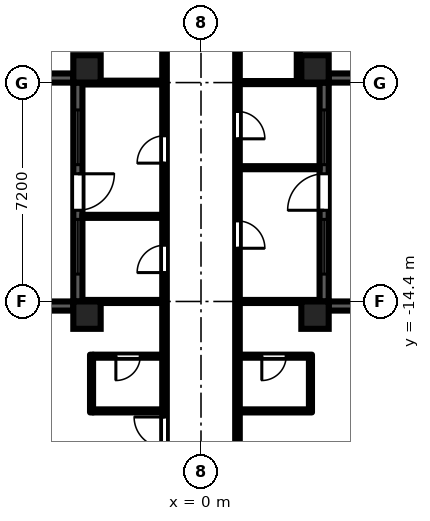
"""IFC4 building model, lengths in metres.
Left out: names, types, materials, properties, quantities, classifications, styles, units other than length and angle.
Written with IfcOpenShell. Run it as: python <this file> out.ifc"""

import sys

from ifc_helpers import new_model, si_unit, direction, frame, frame_2d, origin, origin_2d, place, context, subcontext, project, spatial, rectangle, extrude, element, fill, save


model = new_model("IFC4")
c1 = context("Model", 3, precision=1e-05, world=origin(), true_north=direction((0.0, 1.0)))
c2 = subcontext(c1, "Body", "Model", "MODEL_VIEW")
j1 = project(units=[si_unit("LENGTHUNIT", "METRE"), si_unit("PLANEANGLEUNIT", "RADIAN")], contexts=[c1])
p1 = place(None, origin())
s1 = spatial("IfcSite", under=j1, at=p1, CompositionType="ELEMENT")
p2 = place(p1, origin())
s2 = spatial("IfcBuilding", under=s1, at=p2, CompositionType="ELEMENT")
p3 = place(p2, frame((0.0, 0.0, 35.7)))
s3 = spatial("IfcBuildingStorey", under=s2, at=p3, CompositionType="ELEMENT", Elevation=35.7)
for number, where, z_axis, x_axis in (
    (1, (-3.75, -14.85, 0.0), (0.0, 0.0, 1.0), (1.0, 0.0, 0.0)),
    (2, (-3.75, -6.75, 0.0), (0.0, 0.0, 1.0), (1.0, 0.0, 0.0)),
    (3, (3.75, -14.85, 0.0), (0.0, 0.0, 1.0), (1.0, 0.0, 0.0)),
    (4, (3.75, -6.75, 0.0), (0.0, 0.0, 1.0), (1.0, 0.0, 0.0)),
):
    element("IfcColumn", number, at=place(p3, frame(where, z_axis=z_axis, x_axis=x_axis)), inside=s3, PredefinedType="COLUMN", context=c2, shape_type="SweptSolid", body=[
        extrude(rectangle(XDim=0.9, YDim=0.9, at=origin_2d()), origin(), (0.0, 0.0, 1.0), 3.0),
    ])
p4 = place(p3, frame((-7.2, -7.05, 0.0), z_axis=(0.0, 0.0, 1.0), x_axis=(1.0, 0.0, 0.0)))
e5 = element("IfcWall", 5, at=p4, inside=s3, PredefinedType="SOLIDWALL", context=c2, shape_type="SweptSolid", body=[
    extrude(rectangle(XDim=3.0, YDim=0.3, at=frame_2d((1.5, 0.0))), origin(), (0.0, 0.0, 1.0), 2.1),
])
p5 = place(p3, frame((-4.05, -7.2, 0.0), z_axis=(0.0, 0.0, 1.0), x_axis=(0.0, -1.0, 0.0)))
e6 = element("IfcWall", 6, at=p5, inside=s3, PredefinedType="SOLIDWALL", context=c2, shape_type="SweptSolid", body=[
    extrude(rectangle(XDim=7.2, YDim=0.3, at=frame_2d((3.6, 0.0))), origin(), (0.0, 0.0, 1.0), 2.1),
])
p6 = place(p5, frame((3.0, 0.0, 0.0)))
e7 = element("IfcOpeningElement", 7, at=p6, cuts=e6, PredefinedType="OPENING", context=c2, shape_type="SweptSolid", body=[
    extrude(rectangle(XDim=1.2, YDim=2.05, at=frame_2d((0.6, 1.025))), frame((0.0, 0.16, 0.0), z_axis=(0.0, -1.0, 0.0), x_axis=(1.0, 0.0, 0.0)), (0.0, 0.0, 1.0), 0.32),
])
p7 = place(p5, frame((0.9, 0.0, 0.2)))
e8 = element("IfcOpeningElement", 8, at=p7, cuts=e6, PredefinedType="OPENING", context=c2, shape_type="SweptSolid", body=[
    extrude(rectangle(XDim=1.8, YDim=1.85, at=frame_2d((0.9, 0.925))), frame((0.0, 0.16, 0.0), z_axis=(0.0, -1.0, 0.0), x_axis=(1.0, 0.0, 0.0)), (0.0, 0.0, 1.0), 0.32),
])
p8 = place(p5, frame((4.5, 0.0, 0.2)))
e9 = element("IfcOpeningElement", 9, at=p8, cuts=e6, PredefinedType="OPENING", context=c2, shape_type="SweptSolid", body=[
    extrude(rectangle(XDim=1.8, YDim=1.85, at=frame_2d((0.9, 0.925))), frame((0.0, 0.16, 0.0), z_axis=(0.0, -1.0, 0.0), x_axis=(1.0, 0.0, 0.0)), (0.0, 0.0, 1.0), 0.32),
])
for number, where, z_axis, x_axis in (
    (10, (-4.2, -14.55, 0.0), (0.0, 0.0, 1.0), (-1.0, 0.0, 0.0)),
    (11, (6.3, -14.55, 0.0), (0.0, 0.0, 1.0), (-1.0, 0.0, 0.0)),
):
    element("IfcWall", number, at=place(p3, frame(where, z_axis=z_axis, x_axis=x_axis)), inside=s3, PredefinedType="SOLIDWALL", context=c2, shape_type="SweptSolid", body=[
        extrude(rectangle(XDim=2.1, YDim=0.3, at=frame_2d((1.05, 0.0))), origin(), (0.0, 0.0, 1.0), 2.1),
    ])
p9 = place(p3, frame((4.05, -14.4, 0.0), z_axis=(0.0, 0.0, 1.0), x_axis=(0.0, 1.0, 0.0)))
e12 = element("IfcWall", 12, at=p9, inside=s3, PredefinedType="SOLIDWALL", context=c2, shape_type="SweptSolid", body=[
    extrude(rectangle(XDim=7.2, YDim=0.3, at=frame_2d((3.6, 0.0))), origin(), (0.0, 0.0, 1.0), 2.1),
])
p10 = place(p9, frame((3.0, 0.0, 0.0)))
e13 = element("IfcOpeningElement", 13, at=p10, cuts=e12, PredefinedType="OPENING", context=c2, shape_type="SweptSolid", body=[
    extrude(rectangle(XDim=1.2, YDim=2.05, at=frame_2d((0.6, 1.025))), frame((0.0, 0.16, 0.0), z_axis=(0.0, -1.0, 0.0), x_axis=(1.0, 0.0, 0.0)), (0.0, 0.0, 1.0), 0.32),
])
p11 = place(p9, frame((0.9, 0.0, 0.2)))
e14 = element("IfcOpeningElement", 14, at=p11, cuts=e12, PredefinedType="OPENING", context=c2, shape_type="SweptSolid", body=[
    extrude(rectangle(XDim=1.8, YDim=1.85, at=frame_2d((0.9, 0.925))), frame((0.0, 0.16, 0.0), z_axis=(0.0, -1.0, 0.0), x_axis=(1.0, 0.0, 0.0)), (0.0, 0.0, 1.0), 0.32),
])
p12 = place(p9, frame((4.5, 0.0, 0.2)))
e15 = element("IfcOpeningElement", 15, at=p12, cuts=e12, PredefinedType="OPENING", context=c2, shape_type="SweptSolid", body=[
    extrude(rectangle(XDim=1.8, YDim=1.85, at=frame_2d((0.9, 0.925))), frame((0.0, 0.16, 0.0), z_axis=(0.0, -1.0, 0.0), x_axis=(1.0, 0.0, 0.0)), (0.0, 0.0, 1.0), 0.32),
])
p13 = place(p3, frame((4.2, -7.05, 0.0), z_axis=(0.0, 0.0, 1.0), x_axis=(1.0, 0.0, 0.0)))
e16 = element("IfcWall", 16, at=p13, inside=s3, PredefinedType="SOLIDWALL", context=c2, shape_type="SweptSolid", body=[
    extrude(rectangle(XDim=3.0, YDim=0.3, at=frame_2d((1.5, 0.0))), origin(), (0.0, 0.0, 1.0), 2.1),
])
for number, where, z_axis, x_axis in (
    (17, (-3.9, -14.4, 0.0), (0.0, 0.0, 1.0), (1.0, 0.0, 0.0)),
    (18, (-3.9, -11.6, 0.0), (0.0, 0.0, 1.0), (1.0, 0.0, 0.0)),
):
    element("IfcWall", number, at=place(p3, frame(where, z_axis=z_axis, x_axis=x_axis)), inside=s3, PredefinedType="PARTITIONING", context=c2, shape_type="SweptSolid", body=[
        extrude(rectangle(XDim=2.625, YDim=0.1, at=frame_2d((1.312, 0.0))), origin(), (0.0, 0.0, 1.0), 2.575),
    ])
p14 = place(p3, frame((-3.9, -7.2, 0.0), z_axis=(0.0, 0.0, 1.0), x_axis=(1.0, 0.0, 0.0)))
e19 = element("IfcWall", 19, at=p14, inside=s3, PredefinedType="PARTITIONING", context=c2, shape_type="SweptSolid", body=[
    extrude(rectangle(XDim=2.625, YDim=0.125, at=frame_2d((1.312, 0.0))), origin(), (0.0, 0.0, 1.0), 2.575),
])
p15 = place(p3, frame((-3.6, -18.05, 0.0), z_axis=(0.0, 0.0, 1.0), x_axis=(0.0, 1.0, 0.0)))
e20 = element("IfcWall", 20, at=p15, inside=s3, PredefinedType="PARTITIONING", context=c2, shape_type="SweptSolid", body=[
    extrude(rectangle(XDim=1.9, YDim=0.1, at=frame_2d((0.95, 0.0))), origin(), (0.0, 0.0, 1.0), 2.575),
])
p16 = place(p3, frame((-3.55, -18.0, 0.0), z_axis=(0.0, 0.0, 1.0), x_axis=(1.0, 0.0, 0.0)))
e21 = element("IfcWall", 21, at=p16, inside=s3, PredefinedType="PARTITIONING", context=c2, shape_type="SweptSolid", body=[
    extrude(rectangle(XDim=2.275, YDim=0.1, at=frame_2d((1.138, 0.0))), origin(), (0.0, 0.0, 1.0), 2.575),
])
p17 = place(p3, frame((-3.55, -16.2, 0.0), z_axis=(0.0, 0.0, 1.0), x_axis=(1.0, 0.0, 0.0)))
e22 = element("IfcWall", 22, at=p17, inside=s3, PredefinedType="PARTITIONING", context=c2, shape_type="SweptSolid", body=[
    extrude(rectangle(XDim=2.275, YDim=0.1, at=frame_2d((1.138, 0.0))), origin(), (0.0, 0.0, 1.0), 2.575),
])
p18 = place(p17, frame((0.75, 0.0, 0.0)))
e23 = element("IfcOpeningElement", 23, at=p18, cuts=e22, PredefinedType="OPENING", context=c2, shape_type="SweptSolid", body=[
    extrude(rectangle(XDim=0.8, YDim=2.1, at=frame_2d((0.4, 1.05))), frame((0.0, 0.06, 0.0), z_axis=(0.0, -1.0, 0.0), x_axis=(1.0, 0.0, 0.0)), (0.0, 0.0, 1.0), 0.12),
])
p19 = place(p3, frame((-1.2, -36.5, 0.0), z_axis=(0.0, 0.0, 1.0), x_axis=(0.0, 1.0, 0.0)))
e24 = element("IfcWall", 24, at=p19, inside=s3, PredefinedType="PARTITIONING", context=c2, shape_type="SweptSolid", body=[
    extrude(rectangle(XDim=35.225, YDim=0.15, at=frame_2d((17.613, 0.0))), origin(), (0.0, 0.0, 1.0), 2.575),
])
p20 = place(p19, frame((33.65, 0.0, 0.0)))
e25 = element("IfcOpeningElement", 25, at=p20, cuts=e24, PredefinedType="OPENING", context=c2, shape_type="SweptSolid", body=[
    extrude(rectangle(XDim=0.9, YDim=2.1, at=frame_2d((0.45, 1.05))), frame((0.0, 0.085, 0.0), z_axis=(0.0, -1.0, 0.0), x_axis=(1.0, 0.0, 0.0)), (0.0, 0.0, 1.0), 0.17),
])
p21 = place(p19, frame((30.65, 0.0, 0.0)))
e26 = element("IfcOpeningElement", 26, at=p21, cuts=e24, PredefinedType="OPENING", context=c2, shape_type="SweptSolid", body=[
    extrude(rectangle(XDim=0.9, YDim=2.1, at=frame_2d((0.45, 1.05))), frame((0.0, 0.085, 0.0), z_axis=(0.0, -1.0, 0.0), x_axis=(1.0, 0.0, 0.0)), (0.0, 0.0, 1.0), 0.17),
])
p22 = place(p19, frame((23.05, 0.0, 0.0)))
e27 = element("IfcOpeningElement", 27, at=p22, cuts=e24, PredefinedType="OPENING", context=c2, shape_type="SweptSolid", body=[
    extrude(rectangle(XDim=0.9, YDim=2.1, at=frame_2d((0.45, 1.05))), frame((0.0, 0.085, 0.0), z_axis=(0.0, -1.0, 0.0), x_axis=(1.0, 0.0, 0.0)), (0.0, 0.0, 1.0), 0.17),
])
p23 = place(p19, frame((26.65, 0.0, 0.0)))
e28 = element("IfcOpeningElement", 28, at=p23, cuts=e24, PredefinedType="OPENING", context=c2, shape_type="SweptSolid", body=[
    extrude(rectangle(XDim=0.9, YDim=2.1, at=frame_2d((0.45, 1.05))), frame((0.0, 0.085, 0.0), z_axis=(0.0, -1.0, 0.0), x_axis=(1.0, 0.0, 0.0)), (0.0, 0.0, 1.0), 0.17),
])
p24 = place(p19, frame((17.3, 0.0, 0.0)))
e29 = element("IfcOpeningElement", 29, at=p24, cuts=e24, PredefinedType="OPENING", context=c2, shape_type="SweptSolid", body=[
    extrude(rectangle(XDim=1.0, YDim=2.1, at=frame_2d((0.5, 1.05))), frame((0.0, 0.085, 0.0), z_axis=(0.0, -1.0, 0.0), x_axis=(1.0, 0.0, 0.0)), (0.0, 0.0, 1.0), 0.17),
])
p25 = place(p19, frame((12.65, 0.0, 0.0)))
e30 = element("IfcOpeningElement", 30, at=p25, cuts=e24, PredefinedType="OPENING", context=c2, shape_type="SweptSolid", body=[
    extrude(rectangle(XDim=0.9, YDim=2.1, at=frame_2d((0.45, 1.05))), frame((0.0, 0.085, 0.0), z_axis=(0.0, -1.0, 0.0), x_axis=(1.0, 0.0, 0.0)), (0.0, 0.0, 1.0), 0.17),
])
p26 = place(p19, frame((10.1, 0.0, 0.0)))
e31 = element("IfcOpeningElement", 31, at=p26, cuts=e24, PredefinedType="OPENING", context=c2, shape_type="SweptSolid", body=[
    extrude(rectangle(XDim=1.0, YDim=2.1, at=frame_2d((0.5, 1.05))), frame((0.0, 0.085, 0.0), z_axis=(0.0, -1.0, 0.0), x_axis=(1.0, 0.0, 0.0)), (0.0, 0.0, 1.0), 0.17),
])
p27 = place(p19, frame((6.35, 0.0, 0.0)))
e32 = element("IfcOpeningElement", 32, at=p27, cuts=e24, PredefinedType="OPENING", context=c2, shape_type="SweptSolid", body=[
    extrude(rectangle(XDim=0.9, YDim=2.1, at=frame_2d((0.45, 1.05))), frame((0.0, 0.085, 0.0), z_axis=(0.0, -1.0, 0.0), x_axis=(1.0, 0.0, 0.0)), (0.0, 0.0, 1.0), 0.17),
])
p28 = place(p19, frame((4.55, 0.0, 0.0)))
e33 = element("IfcOpeningElement", 33, at=p28, cuts=e24, PredefinedType="OPENING", context=c2, shape_type="SweptSolid", body=[
    extrude(rectangle(XDim=0.9, YDim=2.1, at=frame_2d((0.45, 1.05))), frame((0.0, 0.085, 0.0), z_axis=(0.0, -1.0, 0.0), x_axis=(1.0, 0.0, 0.0)), (0.0, 0.0, 1.0), 0.17),
])
p29 = place(p19, frame((1.15, 0.0, 0.0)))
e34 = element("IfcOpeningElement", 34, at=p29, cuts=e24, PredefinedType="OPENING", context=c2, shape_type="SweptSolid", body=[
    extrude(rectangle(XDim=1.8, YDim=2.1, at=frame_2d((0.9, 1.05))), frame((0.0, 0.085, 0.0), z_axis=(0.0, -1.0, 0.0), x_axis=(1.0, 0.0, 0.0)), (0.0, 0.0, 1.0), 0.17),
])
p30 = place(p3, frame((1.2, -36.5, 0.0), z_axis=(0.0, 0.0, 1.0), x_axis=(0.0, 1.0, 0.0)))
e35 = element("IfcWall", 35, at=p30, inside=s3, PredefinedType="PARTITIONING", context=c2, shape_type="SweptSolid", body=[
    extrude(rectangle(XDim=35.375, YDim=0.15, at=frame_2d((17.688, 0.0))), origin(), (0.0, 0.0, 1.0), 2.575),
])
p31 = place(p30, frame((31.85, 0.0, 0.0)))
e36 = element("IfcOpeningElement", 36, at=p31, cuts=e35, PredefinedType="OPENING", context=c2, shape_type="SweptSolid", body=[
    extrude(rectangle(XDim=0.9, YDim=2.1, at=frame_2d((0.45, 1.05))), frame((0.0, 0.085, 0.0), z_axis=(0.0, -1.0, 0.0), x_axis=(1.0, 0.0, 0.0)), (0.0, 0.0, 1.0), 0.17),
])
p32 = place(p30, frame((27.45, 0.0, 0.0)))
e37 = element("IfcOpeningElement", 37, at=p32, cuts=e35, PredefinedType="OPENING", context=c2, shape_type="SweptSolid", body=[
    extrude(rectangle(XDim=0.9, YDim=2.1, at=frame_2d((0.45, 1.05))), frame((0.0, 0.085, 0.0), z_axis=(0.0, -1.0, 0.0), x_axis=(1.0, 0.0, 0.0)), (0.0, 0.0, 1.0), 0.17),
])
p33 = place(p30, frame((23.85, 0.0, 0.0)))
e38 = element("IfcOpeningElement", 38, at=p33, cuts=e35, PredefinedType="OPENING", context=c2, shape_type="SweptSolid", body=[
    extrude(rectangle(XDim=0.9, YDim=2.1, at=frame_2d((0.45, 1.05))), frame((0.0, 0.085, 0.0), z_axis=(0.0, -1.0, 0.0), x_axis=(1.0, 0.0, 0.0)), (0.0, 0.0, 1.0), 0.17),
])
p34 = place(p30, frame((15.1, 0.0, 0.0)))
e39 = element("IfcOpeningElement", 39, at=p34, cuts=e35, PredefinedType="OPENING", context=c2, shape_type="SweptSolid", body=[
    extrude(rectangle(XDim=1.0, YDim=2.1, at=frame_2d((0.5, 1.05))), frame((0.0, 0.085, 0.0), z_axis=(0.0, -1.0, 0.0), x_axis=(1.0, 0.0, 0.0)), (0.0, 0.0, 1.0), 0.17),
])
p35 = place(p30, frame((8.01, 0.0, 0.0)))
e40 = element("IfcOpeningElement", 40, at=p35, cuts=e35, PredefinedType="OPENING", context=c2, shape_type="SweptSolid", body=[
    extrude(rectangle(XDim=1.0, YDim=2.1, at=frame_2d((0.5, 1.05))), frame((0.0, 0.085, 0.0), z_axis=(0.0, -1.0, 0.0), x_axis=(1.0, 0.0, 0.0)), (0.0, 0.0, 1.0), 0.17),
])
p36 = place(p30, frame((6.35, 0.0, 0.0)))
e41 = element("IfcOpeningElement", 41, at=p36, cuts=e35, PredefinedType="OPENING", context=c2, shape_type="SweptSolid", body=[
    extrude(rectangle(XDim=0.9, YDim=2.1, at=frame_2d((0.45, 1.05))), frame((0.0, 0.085, 0.0), z_axis=(0.0, -1.0, 0.0), x_axis=(1.0, 0.0, 0.0)), (0.0, 0.0, 1.0), 0.17),
])
p37 = place(p30, frame((4.55, 0.0, 0.0)))
e42 = element("IfcOpeningElement", 42, at=p37, cuts=e35, PredefinedType="OPENING", context=c2, shape_type="SweptSolid", body=[
    extrude(rectangle(XDim=0.9, YDim=2.1, at=frame_2d((0.45, 1.05))), frame((0.0, 0.085, 0.0), z_axis=(0.0, -1.0, 0.0), x_axis=(1.0, 0.0, 0.0)), (0.0, 0.0, 1.0), 0.17),
])
p38 = place(p30, frame((1.15, 0.0, 0.0)))
e43 = element("IfcOpeningElement", 43, at=p38, cuts=e35, PredefinedType="OPENING", context=c2, shape_type="SweptSolid", body=[
    extrude(rectangle(XDim=1.8, YDim=2.1, at=frame_2d((0.9, 1.05))), frame((0.0, 0.085, 0.0), z_axis=(0.0, -1.0, 0.0), x_axis=(1.0, 0.0, 0.0)), (0.0, 0.0, 1.0), 0.17),
])
p39 = place(p3, frame((1.275, -18.0, 0.0), z_axis=(0.0, 0.0, 1.0), x_axis=(1.0, 0.0, 0.0)))
e44 = element("IfcWall", 44, at=p39, inside=s3, PredefinedType="PARTITIONING", context=c2, shape_type="SweptSolid", body=[
    extrude(rectangle(XDim=2.375, YDim=0.1, at=frame_2d((1.188, 0.0))), origin(), (0.0, 0.0, 1.0), 2.575),
])
p40 = place(p3, frame((1.275, -16.2, 0.0), z_axis=(0.0, 0.0, 1.0), x_axis=(1.0, 0.0, 0.0)))
e45 = element("IfcWall", 45, at=p40, inside=s3, PredefinedType="PARTITIONING", context=c2, shape_type="SweptSolid", body=[
    extrude(rectangle(XDim=2.375, YDim=0.1, at=frame_2d((1.188, 0.0))), origin(), (0.0, 0.0, 1.0), 2.575),
])
p41 = place(p40, frame((0.725, 0.0, 0.0)))
e46 = element("IfcOpeningElement", 46, at=p41, cuts=e45, PredefinedType="OPENING", context=c2, shape_type="SweptSolid", body=[
    extrude(rectangle(XDim=0.8, YDim=2.1, at=frame_2d((0.4, 1.05))), frame((0.0, 0.06, 0.0), z_axis=(0.0, -1.0, 0.0), x_axis=(1.0, 0.0, 0.0)), (0.0, 0.0, 1.0), 0.12),
])
for number, where, z_axis, x_axis in (
    (47, (1.275, -14.4, 0.0), (0.0, 0.0, 1.0), (1.0, 0.0, 0.0)),
    (48, (1.275, -10.0, 0.0), (0.0, 0.0, 1.0), (1.0, 0.0, 0.0)),
    (49, (1.275, -7.2, 0.0), (0.0, 0.0, 1.0), (1.0, 0.0, 0.0)),
):
    element("IfcWall", number, at=place(p3, frame(where, z_axis=z_axis, x_axis=x_axis)), inside=s3, PredefinedType="PARTITIONING", context=c2, shape_type="SweptSolid", body=[
        extrude(rectangle(XDim=2.625, YDim=0.1, at=frame_2d((1.312, 0.0))), origin(), (0.0, 0.0, 1.0), 2.575),
    ])
p42 = place(p3, frame((3.2, -7.15, 0.0), z_axis=(0.0, 0.0, 1.0), x_axis=(0.0, 1.0, 0.0)))
e50 = element("IfcWall", 50, at=p42, inside=s3, PredefinedType="PARTITIONING", context=c2, shape_type="SweptSolid", body=[
    extrude(rectangle(XDim=5.875, YDim=0.1, at=frame_2d((2.938, 0.0))), origin(), (0.0, 0.0, 1.0), 2.575),
])
p43 = place(p3, frame((3.6, -17.95, 0.0), z_axis=(0.0, 0.0, 1.0), x_axis=(0.0, 1.0, 0.0)))
e51 = element("IfcWall", 51, at=p43, inside=s3, PredefinedType="PARTITIONING", context=c2, shape_type="SweptSolid", body=[
    extrude(rectangle(XDim=1.7, YDim=0.1, at=frame_2d((0.85, 0.0))), origin(), (0.0, 0.0, 1.0), 2.575),
])
p44 = place(p6, origin())
e52 = element("IfcDoor", 52, at=p44, inside=s3, OperationType="SINGLE_SWING_LEFT", PredefinedType="DOOR", context=c2, shape_type="SweptSolid", body=[
    extrude(rectangle(XDim=1.2, YDim=2.05, at=frame_2d((0.6, 1.025))), frame((0.0, 0.025, 0.0), z_axis=(0.0, -1.0, 0.0), x_axis=(1.0, 0.0, 0.0)), (0.0, 0.0, 1.0), 0.05),
])
fill(e7, e52)
p45 = place(p7, origin())
e53 = element("IfcWindow", 53, at=p45, inside=s3, PartitioningType="SINGLE_PANEL", PredefinedType="WINDOW", context=c2, shape_type="SweptSolid", body=[
    extrude(rectangle(XDim=1.8, YDim=1.85, at=frame_2d((0.9, 0.925))), frame((0.0, 0.03, 0.0), z_axis=(0.0, -1.0, 0.0), x_axis=(1.0, 0.0, 0.0)), (0.0, 0.0, 1.0), 0.06),
])
fill(e8, e53)
p46 = place(p8, origin())
e54 = element("IfcWindow", 54, at=p46, inside=s3, PartitioningType="SINGLE_PANEL", PredefinedType="WINDOW", context=c2, shape_type="SweptSolid", body=[
    extrude(rectangle(XDim=1.8, YDim=1.85, at=frame_2d((0.9, 0.925))), frame((0.0, 0.03, 0.0), z_axis=(0.0, -1.0, 0.0), x_axis=(1.0, 0.0, 0.0)), (0.0, 0.0, 1.0), 0.06),
])
fill(e9, e54)
p47 = place(p10, origin())
e55 = element("IfcDoor", 55, at=p47, inside=s3, OperationType="SINGLE_SWING_LEFT", PredefinedType="DOOR", context=c2, shape_type="SweptSolid", body=[
    extrude(rectangle(XDim=1.2, YDim=2.05, at=frame_2d((0.6, 1.025))), frame((0.0, 0.025, 0.0), z_axis=(0.0, -1.0, 0.0), x_axis=(1.0, 0.0, 0.0)), (0.0, 0.0, 1.0), 0.05),
])
fill(e13, e55)
p48 = place(p11, origin())
e56 = element("IfcWindow", 56, at=p48, inside=s3, PartitioningType="SINGLE_PANEL", PredefinedType="WINDOW", context=c2, shape_type="SweptSolid", body=[
    extrude(rectangle(XDim=1.8, YDim=1.85, at=frame_2d((0.9, 0.925))), frame((0.0, 0.03, 0.0), z_axis=(0.0, -1.0, 0.0), x_axis=(1.0, 0.0, 0.0)), (0.0, 0.0, 1.0), 0.06),
])
fill(e14, e56)
p49 = place(p12, origin())
e57 = element("IfcWindow", 57, at=p49, inside=s3, PartitioningType="SINGLE_PANEL", PredefinedType="WINDOW", context=c2, shape_type="SweptSolid", body=[
    extrude(rectangle(XDim=1.8, YDim=1.85, at=frame_2d((0.9, 0.925))), frame((0.0, 0.03, 0.0), z_axis=(0.0, -1.0, 0.0), x_axis=(1.0, 0.0, 0.0)), (0.0, 0.0, 1.0), 0.06),
])
fill(e15, e57)
p50 = place(p32, frame((0.9, 0.0, 0.0), z_axis=(0.0, 0.0, 1.0), x_axis=(-1.0, 0.0, 0.0)))
e58 = element("IfcDoor", 58, at=p50, inside=s3, OperationType="SINGLE_SWING_RIGHT", PredefinedType="DOOR", context=c2, shape_type="SweptSolid", body=[
    extrude(rectangle(XDim=0.9, YDim=2.1, at=frame_2d((0.45, 1.05))), frame((0.0, 0.025, 0.0), z_axis=(0.0, -1.0, 0.0), x_axis=(1.0, 0.0, 0.0)), (0.0, 0.0, 1.0), 0.05),
])
fill(e37, e58)
p51 = place(p33, frame((0.9, 0.0, 0.0), z_axis=(0.0, 0.0, 1.0), x_axis=(-1.0, 0.0, 0.0)))
e59 = element("IfcDoor", 59, at=p51, inside=s3, OperationType="SINGLE_SWING_RIGHT", PredefinedType="DOOR", context=c2, shape_type="SweptSolid", body=[
    extrude(rectangle(XDim=0.9, YDim=2.1, at=frame_2d((0.45, 1.05))), frame((0.0, 0.025, 0.0), z_axis=(0.0, -1.0, 0.0), x_axis=(1.0, 0.0, 0.0)), (0.0, 0.0, 1.0), 0.05),
])
fill(e38, e59)
p52 = place(p41, frame((0.8, 0.0, 0.0), z_axis=(0.0, 0.0, 1.0), x_axis=(-1.0, 0.0, 0.0)))
e60 = element("IfcDoor", 60, at=p52, inside=s3, OperationType="SINGLE_SWING_RIGHT", PredefinedType="DOOR", context=c2, shape_type="SweptSolid", body=[
    extrude(rectangle(XDim=0.8, YDim=2.1, at=frame_2d((0.4, 1.05))), frame((0.0, 0.025, 0.0), z_axis=(0.0, -1.0, 0.0), x_axis=(1.0, 0.0, 0.0)), (0.0, 0.0, 1.0), 0.05),
])
fill(e46, e60)
p53 = place(p22, origin())
e61 = element("IfcDoor", 61, at=p53, inside=s3, OperationType="SINGLE_SWING_LEFT", PredefinedType="DOOR", context=c2, shape_type="SweptSolid", body=[
    extrude(rectangle(XDim=0.9, YDim=2.1, at=frame_2d((0.45, 1.05))), frame((0.0, 0.025, 0.0), z_axis=(0.0, -1.0, 0.0), x_axis=(1.0, 0.0, 0.0)), (0.0, 0.0, 1.0), 0.05),
])
fill(e27, e61)
p54 = place(p23, origin())
e62 = element("IfcDoor", 62, at=p54, inside=s3, OperationType="SINGLE_SWING_LEFT", PredefinedType="DOOR", context=c2, shape_type="SweptSolid", body=[
    extrude(rectangle(XDim=0.9, YDim=2.1, at=frame_2d((0.45, 1.05))), frame((0.0, 0.025, 0.0), z_axis=(0.0, -1.0, 0.0), x_axis=(1.0, 0.0, 0.0)), (0.0, 0.0, 1.0), 0.05),
])
fill(e28, e62)
p55 = place(p18, frame((0.8, 0.0, 0.0), z_axis=(0.0, 0.0, 1.0), x_axis=(-1.0, 0.0, 0.0)))
e63 = element("IfcDoor", 63, at=p55, inside=s3, OperationType="SINGLE_SWING_RIGHT", PredefinedType="DOOR", context=c2, shape_type="SweptSolid", body=[
    extrude(rectangle(XDim=0.8, YDim=2.1, at=frame_2d((0.4, 1.05))), frame((0.0, 0.025, 0.0), z_axis=(0.0, -1.0, 0.0), x_axis=(1.0, 0.0, 0.0)), (0.0, 0.0, 1.0), 0.05),
])
fill(e23, e63)
p56 = place(p24, origin())
e64 = element("IfcDoor", 64, at=p56, inside=s3, OperationType="SINGLE_SWING_RIGHT", PredefinedType="DOOR", context=c2, shape_type="SweptSolid", body=[
    extrude(rectangle(XDim=1.0, YDim=2.1, at=frame_2d((0.5, 1.05))), frame((0.0, 0.025, 0.0), z_axis=(0.0, -1.0, 0.0), x_axis=(1.0, 0.0, 0.0)), (0.0, 0.0, 1.0), 0.05),
])
fill(e29, e64)
save(model, sys.argv[1])
